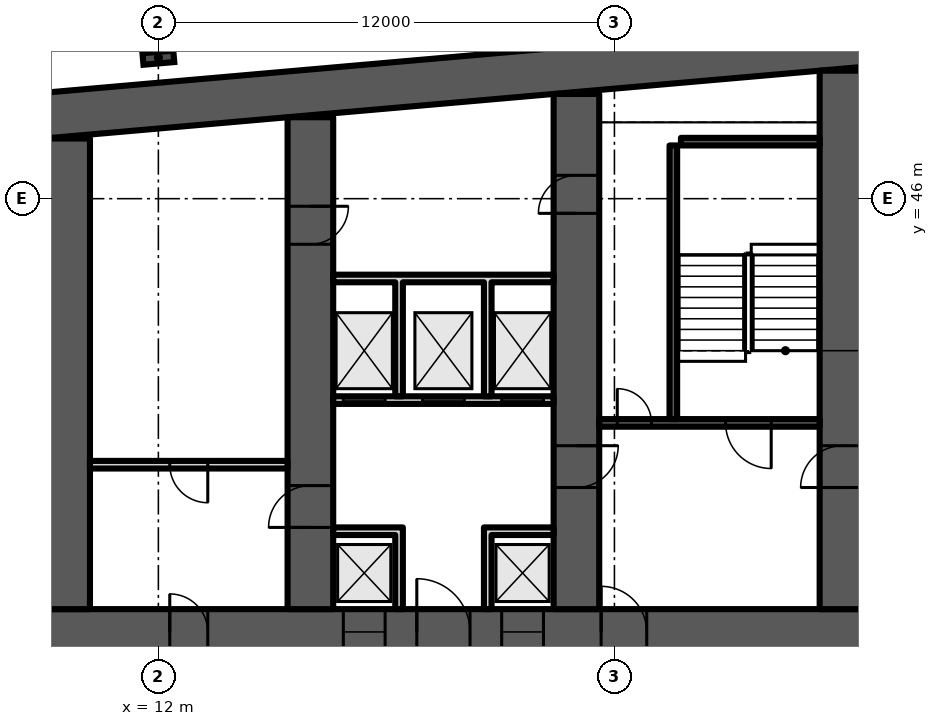
"""IFC4 building model, lengths in metres.
Left out: names, types, materials, properties, quantities, classifications, styles, units other than length and angle.
Written with IfcOpenShell. Run it as: python <this file> out.ifc"""

import sys

from ifc_helpers import new_model, si_unit, direction, frame, frame_2d, origin, origin_2d, place, context, subcontext, project, spatial, polyline, rectangle, i_section, outline, extrude, element, fill, save


model = new_model("IFC4")
c1 = context("Model", 3, precision=1e-05, world=origin(), true_north=direction((0.0, 1.0)))
c2 = subcontext(c1, "Body", "Model", "MODEL_VIEW")
j1 = project(units=[si_unit("LENGTHUNIT", "METRE"), si_unit("PLANEANGLEUNIT", "RADIAN")], contexts=[c1])
p1 = place(None, origin())
s1 = spatial("IfcSite", under=j1, at=p1, CompositionType="ELEMENT")
p2 = place(p1, origin())
s2 = spatial("IfcBuilding", under=s1, at=p2, CompositionType="ELEMENT")
p3 = place(p2, frame((0.0, 0.0, 70.3)))
s3 = spatial("IfcBuildingStorey", under=s2, at=p3, CompositionType="ELEMENT", Elevation=70.3)
p4 = place(p3, frame((0.0, 0.0, -0.0)))
e1 = element("IfcWall", 1, at=p4, inside=s3, PredefinedType="SHEAR", context=c2, shape_type="SweptSolid", body=[
    extrude(outline(polyline([(9.0, 47.583), (37.0, 50.032), (65.0, 47.583), (65.0, 48.787), (37.0, 51.237), (9.0, 48.787), (9.0, 47.583)])), origin(), (0.0, 0.0, 1.0), 3.6),
])
p5 = place(p3, frame((9.0, 34.6, 0.0), z_axis=(0.0, 0.0, 1.0), x_axis=(1.0, 0.0, 0.0)))
e2 = element("IfcWall", 2, at=p5, inside=s3, PredefinedType="SHEAR", context=c2, shape_type="SweptSolid", body=[
    extrude(rectangle(XDim=56.0, YDim=1.2, at=frame_2d((28.0, 0.0))), origin(), (0.0, 0.0, 1.0), 3.6),
])
p6 = place(p5, frame((3.3, 0.0, 0.0)))
e3 = element("IfcOpeningElement", 3, at=p6, cuts=e2, PredefinedType="OPENING", context=c2, shape_type="SweptSolid", body=[
    extrude(rectangle(XDim=1.0, YDim=2.1, at=frame_2d((0.5, 1.05))), frame((0.0, 0.61, 0.0), z_axis=(0.0, -1.0, 0.0), x_axis=(1.0, 0.0, 0.0)), (0.0, 0.0, 1.0), 1.22),
])
p7 = place(p5, frame((7.867, 0.0, 0.0)))
e4 = element("IfcOpeningElement", 4, at=p7, cuts=e2, PredefinedType="OPENING", context=c2, shape_type="SweptSolid", body=[
    extrude(rectangle(XDim=1.1, YDim=2.1, at=frame_2d((0.55, 1.05))), frame((0.0, 0.61, 0.0), z_axis=(0.0, -1.0, 0.0), x_axis=(1.0, 0.0, 0.0)), (0.0, 0.0, 1.0), 1.22),
])
p8 = place(p5, frame((12.033, 0.0, 0.0)))
e5 = element("IfcOpeningElement", 5, at=p8, cuts=e2, PredefinedType="OPENING", context=c2, shape_type="SweptSolid", body=[
    extrude(rectangle(XDim=1.1, YDim=2.1, at=frame_2d((0.55, 1.05))), frame((0.0, 0.61, 0.0), z_axis=(0.0, -1.0, 0.0), x_axis=(1.0, 0.0, 0.0)), (0.0, 0.0, 1.0), 1.22),
])
p9 = place(p5, frame((9.8, 0.0, 0.0)))
e6 = element("IfcOpeningElement", 6, at=p9, cuts=e2, PredefinedType="OPENING", context=c2, shape_type="SweptSolid", body=[
    extrude(rectangle(XDim=1.4, YDim=2.1, at=frame_2d((0.7, 1.05))), frame((0.0, 0.61, 0.0), z_axis=(0.0, -1.0, 0.0), x_axis=(1.0, 0.0, 0.0)), (0.0, 0.0, 1.0), 1.22),
])
p10 = place(p5, frame((14.65, 0.0, 0.0)))
e7 = element("IfcOpeningElement", 7, at=p10, cuts=e2, PredefinedType="OPENING", context=c2, shape_type="SweptSolid", body=[
    extrude(rectangle(XDim=1.2, YDim=2.1, at=frame_2d((0.6, 1.05))), frame((0.0, 0.61, 0.0), z_axis=(0.0, -1.0, 0.0), x_axis=(1.0, 0.0, 0.0)), (0.0, 0.0, 1.0), 1.22),
])
p11 = place(p5, frame((21.867, 0.0, 0.0)))
e8 = element("IfcOpeningElement", 8, at=p11, cuts=e2, PredefinedType="OPENING", context=c2, shape_type="SweptSolid", body=[
    extrude(rectangle(XDim=1.1, YDim=2.1, at=frame_2d((0.55, 1.05))), frame((0.0, 0.61, 0.0), z_axis=(0.0, -1.0, 0.0), x_axis=(1.0, 0.0, 0.0)), (0.0, 0.0, 1.0), 1.22),
])
p12 = place(p5, frame((26.033, 0.0, 0.0)))
e9 = element("IfcOpeningElement", 9, at=p12, cuts=e2, PredefinedType="OPENING", context=c2, shape_type="SweptSolid", body=[
    extrude(rectangle(XDim=1.1, YDim=2.1, at=frame_2d((0.55, 1.05))), frame((0.0, 0.61, 0.0), z_axis=(0.0, -1.0, 0.0), x_axis=(1.0, 0.0, 0.0)), (0.0, 0.0, 1.0), 1.22),
])
p13 = place(p5, frame((23.8, 0.0, 0.0)))
e10 = element("IfcOpeningElement", 10, at=p13, cuts=e2, PredefinedType="OPENING", context=c2, shape_type="SweptSolid", body=[
    extrude(rectangle(XDim=1.4, YDim=2.1, at=frame_2d((0.7, 1.05))), frame((0.0, 0.61, 0.0), z_axis=(0.0, -1.0, 0.0), x_axis=(1.0, 0.0, 0.0)), (0.0, 0.0, 1.0), 1.22),
])
p14 = place(p5, frame((28.867, 0.0, 0.0)))
e11 = element("IfcOpeningElement", 11, at=p14, cuts=e2, PredefinedType="OPENING", context=c2, shape_type="SweptSolid", body=[
    extrude(rectangle(XDim=1.1, YDim=2.1, at=frame_2d((0.55, 1.05))), frame((0.0, 0.61, 0.0), z_axis=(0.0, -1.0, 0.0), x_axis=(1.0, 0.0, 0.0)), (0.0, 0.0, 1.0), 1.22),
])
p15 = place(p5, frame((33.033, 0.0, 0.0)))
e12 = element("IfcOpeningElement", 12, at=p15, cuts=e2, PredefinedType="OPENING", context=c2, shape_type="SweptSolid", body=[
    extrude(rectangle(XDim=1.1, YDim=2.1, at=frame_2d((0.55, 1.05))), frame((0.0, 0.61, 0.0), z_axis=(0.0, -1.0, 0.0), x_axis=(1.0, 0.0, 0.0)), (0.0, 0.0, 1.0), 1.22),
])
p16 = place(p5, frame((40.15, 0.0, 0.0)))
e13 = element("IfcOpeningElement", 13, at=p16, cuts=e2, PredefinedType="OPENING", context=c2, shape_type="SweptSolid", body=[
    extrude(rectangle(XDim=1.2, YDim=2.1, at=frame_2d((0.6, 1.05))), frame((0.0, 0.61, 0.0), z_axis=(0.0, -1.0, 0.0), x_axis=(1.0, 0.0, 0.0)), (0.0, 0.0, 1.0), 1.22),
])
p17 = place(p5, frame((44.8, 0.0, 0.0)))
e14 = element("IfcOpeningElement", 14, at=p17, cuts=e2, PredefinedType="OPENING", context=c2, shape_type="SweptSolid", body=[
    extrude(rectangle(XDim=1.4, YDim=2.1, at=frame_2d((0.7, 1.05))), frame((0.0, 0.61, 0.0), z_axis=(0.0, -1.0, 0.0), x_axis=(1.0, 0.0, 0.0)), (0.0, 0.0, 1.0), 1.22),
])
p18 = place(p5, frame((49.867, 0.0, 0.0)))
e15 = element("IfcOpeningElement", 15, at=p18, cuts=e2, PredefinedType="OPENING", context=c2, shape_type="SweptSolid", body=[
    extrude(rectangle(XDim=1.1, YDim=2.1, at=frame_2d((0.55, 1.05))), frame((0.0, 0.61, 0.0), z_axis=(0.0, -1.0, 0.0), x_axis=(1.0, 0.0, 0.0)), (0.0, 0.0, 1.0), 1.22),
])
p19 = place(p5, frame((53.5, 0.0, 0.0)))
e16 = element("IfcOpeningElement", 16, at=p19, cuts=e2, PredefinedType="OPENING", context=c2, shape_type="SweptSolid", body=[
    extrude(rectangle(XDim=1.1, YDim=2.1, at=frame_2d((0.55, 1.05))), frame((0.0, 0.61, 0.0), z_axis=(0.0, -1.0, 0.0), x_axis=(1.0, 0.0, 0.0)), (0.0, 0.0, 1.0), 1.22),
])
p20 = place(p5, frame((51.567, 0.0, 0.0)))
e17 = element("IfcOpeningElement", 17, at=p20, cuts=e2, PredefinedType="OPENING", context=c2, shape_type="SweptSolid", body=[
    extrude(rectangle(XDim=1.4, YDim=2.1, at=frame_2d((0.7, 1.05))), frame((0.0, 0.61, 0.0), z_axis=(0.0, -1.0, 0.0), x_axis=(1.0, 0.0, 0.0)), (0.0, 0.0, 1.0), 1.22),
])
p21 = place(p3, frame((9.6, 35.2, 0.0), z_axis=(0.0, 0.0, 1.0), x_axis=(0.0, 1.0, 0.0)))
e18 = element("IfcWall", 18, at=p21, inside=s3, PredefinedType="SHEAR", context=c2, shape_type="SweptSolid", body=[
    extrude(rectangle(XDim=12.383, YDim=1.2, at=frame_2d((6.191, 0.0))), origin(), (0.0, 0.0, 1.0), 3.6),
])
p22 = place(p3, frame((16.0, 35.2, 0.0), z_axis=(0.0, 0.0, 1.0), x_axis=(0.0, 1.0, 0.0)))
e19 = element("IfcWall", 19, at=p22, inside=s3, PredefinedType="SHEAR", context=c2, shape_type="SweptSolid", body=[
    extrude(rectangle(XDim=12.943, YDim=1.2, at=frame_2d((6.471, 0.0))), origin(), (0.0, 0.0, 1.0), 3.6),
])
p23 = place(p22, frame((2.15, 0.0, 0.0)))
e20 = element("IfcOpeningElement", 20, at=p23, cuts=e19, PredefinedType="OPENING", context=c2, shape_type="SweptSolid", body=[
    extrude(rectangle(XDim=1.1, YDim=2.1, at=frame_2d((0.55, 1.05))), frame((0.0, 0.61, 0.0), z_axis=(0.0, -1.0, 0.0), x_axis=(1.0, 0.0, 0.0)), (0.0, 0.0, 1.0), 1.22),
])
p24 = place(p22, frame((9.6, 0.0, 0.0)))
e21 = element("IfcOpeningElement", 21, at=p24, cuts=e19, PredefinedType="OPENING", context=c2, shape_type="SweptSolid", body=[
    extrude(rectangle(XDim=1.0, YDim=2.1, at=frame_2d((0.5, 1.05))), frame((0.0, 0.61, 0.0), z_axis=(0.0, -1.0, 0.0), x_axis=(1.0, 0.0, 0.0)), (0.0, 0.0, 1.0), 1.22),
])
p25 = place(p3, frame((23.0, 35.2, 0.0), z_axis=(0.0, 0.0, 1.0), x_axis=(0.0, 1.0, 0.0)))
e22 = element("IfcWall", 22, at=p25, inside=s3, PredefinedType="SHEAR", context=c2, shape_type="SweptSolid", body=[
    extrude(rectangle(XDim=13.555, YDim=1.2, at=frame_2d((6.778, 0.0))), origin(), (0.0, 0.0, 1.0), 3.6),
])
p26 = place(p25, frame((10.414, 0.0, 0.0)))
e23 = element("IfcOpeningElement", 23, at=p26, cuts=e22, PredefinedType="OPENING", context=c2, shape_type="SweptSolid", body=[
    extrude(rectangle(XDim=1.0, YDim=2.1, at=frame_2d((0.5, 1.05))), frame((0.0, 0.61, 0.0), z_axis=(0.0, -1.0, 0.0), x_axis=(1.0, 0.0, 0.0)), (0.0, 0.0, 1.0), 1.22),
])
p27 = place(p25, frame((3.2, 0.0, 0.0)))
e24 = element("IfcOpeningElement", 24, at=p27, cuts=e22, PredefinedType="OPENING", context=c2, shape_type="SweptSolid", body=[
    extrude(rectangle(XDim=1.1, YDim=2.1, at=frame_2d((0.55, 1.05))), frame((0.0, 0.61, 0.0), z_axis=(0.0, -1.0, 0.0), x_axis=(1.0, 0.0, 0.0)), (0.0, 0.0, 1.0), 1.22),
])
p28 = place(p3, frame((30.0, 35.2, 0.0), z_axis=(0.0, 0.0, 1.0), x_axis=(0.0, 1.0, 0.0)))
e25 = element("IfcWall", 25, at=p28, inside=s3, PredefinedType="SHEAR", context=c2, shape_type="SweptSolid", body=[
    extrude(rectangle(XDim=14.168, YDim=1.2, at=frame_2d((7.084, 0.0))), origin(), (0.0, 0.0, 1.0), 3.6),
])
p29 = place(p28, frame((3.2, 0.0, 0.0)))
e26 = element("IfcOpeningElement", 26, at=p29, cuts=e25, PredefinedType="OPENING", context=c2, shape_type="SweptSolid", body=[
    extrude(rectangle(XDim=1.1, YDim=2.1, at=frame_2d((0.55, 1.05))), frame((0.0, 0.61, 0.0), z_axis=(0.0, -1.0, 0.0), x_axis=(1.0, 0.0, 0.0)), (0.0, 0.0, 1.0), 1.22),
])
p30 = place(p3, frame((12.0, 49.71, 0.0), z_axis=(0.0, 0.0, 1.0), x_axis=(-0.087156, 0.996197, 0.0)))
e27 = element("IfcColumn", 27, at=p30, inside=s3, PredefinedType="COLUMN", context=c2, shape_type="SweptSolid", body=[
    extrude(i_section(OverallWidth=0.303, OverallDepth=0.814, WebThickness=0.021, FlangeThickness=0.04, FilletRadius=0.03, at=origin_2d()), origin(), (0.0, 0.0, 1.0), 3.6),
])
p31 = place(p3, frame((10.2, 39.0, 0.0), z_axis=(0.0, 0.0, 1.0), x_axis=(1.0, 0.0, 0.0)))
e28 = element("IfcWall", 28, at=p31, inside=s3, PredefinedType="PARTITIONING", context=c2, shape_type="SweptSolid", body=[
    extrude(rectangle(XDim=5.2, YDim=0.2, at=frame_2d((2.6, 0.0))), origin(), (0.0, 0.0, 1.0), 3.2),
])
p32 = place(p31, frame((2.1, 0.0, 0.0)))
e29 = element("IfcOpeningElement", 29, at=p32, cuts=e28, PredefinedType="OPENING", context=c2, shape_type="SweptSolid", body=[
    extrude(rectangle(XDim=1.0, YDim=2.1, at=frame_2d((0.5, 1.05))), frame((0.0, 0.11, 0.0), z_axis=(0.0, -1.0, 0.0), x_axis=(1.0, 0.0, 0.0)), (0.0, 0.0, 1.0), 0.22),
])
p33 = place(p3, frame((16.6, 40.7, 0.0), z_axis=(0.0, 0.0, 1.0), x_axis=(1.0, 0.0, 0.0)))
e30 = element("IfcWall", 30, at=p33, inside=s3, PredefinedType="PARTITIONING", context=c2, shape_type="SweptSolid", body=[
    extrude(rectangle(XDim=5.8, YDim=0.2, at=frame_2d((2.9, 0.0))), origin(), (0.0, 0.0, 1.0), 3.2),
])
p34 = place(p33, frame((0.267, 0.0, 0.0)))
e31 = element("IfcOpeningElement", 31, at=p34, cuts=e30, PredefinedType="OPENING", context=c2, shape_type="SweptSolid", body=[
    extrude(rectangle(XDim=1.1, YDim=2.1, at=frame_2d((0.55, 1.05))), frame((0.0, 0.11, 0.0), z_axis=(0.0, -1.0, 0.0), x_axis=(1.0, 0.0, 0.0)), (0.0, 0.0, 1.0), 0.22),
])
p35 = place(p33, frame((2.35, 0.0, 0.0)))
e32 = element("IfcOpeningElement", 32, at=p35, cuts=e30, PredefinedType="OPENING", context=c2, shape_type="SweptSolid", body=[
    extrude(rectangle(XDim=1.1, YDim=2.1, at=frame_2d((0.55, 1.05))), frame((0.0, 0.11, 0.0), z_axis=(0.0, -1.0, 0.0), x_axis=(1.0, 0.0, 0.0)), (0.0, 0.0, 1.0), 0.22),
])
p36 = place(p33, frame((4.433, 0.0, 0.0)))
e33 = element("IfcOpeningElement", 33, at=p36, cuts=e30, PredefinedType="OPENING", context=c2, shape_type="SweptSolid", body=[
    extrude(rectangle(XDim=1.1, YDim=2.1, at=frame_2d((0.55, 1.05))), frame((0.0, 0.11, 0.0), z_axis=(0.0, -1.0, 0.0), x_axis=(1.0, 0.0, 0.0)), (0.0, 0.0, 1.0), 0.22),
])
p37 = place(p3, frame((0.0, 0.0, -0.0)))
e34 = element("IfcWall", 34, at=p37, inside=s3, PredefinedType="PARTITIONING", context=c2, shape_type="SweptSolid", body=[
    extrude(outline(polyline([(18.233, 37.15), (16.6, 37.15), (16.6, 37.35), (18.233, 37.35), (18.433, 37.35), (18.433, 35.2), (18.233, 35.2), (18.233, 37.15)])), origin(), (0.0, 0.0, 1.0), 3.2),
])
p38 = place(p3, frame((0.0, 0.0, -0.0)))
e35 = element("IfcWall", 35, at=p38, inside=s3, PredefinedType="PARTITIONING", context=c2, shape_type="SweptSolid", body=[
    extrude(outline(polyline([(20.567, 37.35), (20.767, 37.35), (22.4, 37.35), (22.4, 37.15), (20.767, 37.15), (20.767, 35.2), (20.567, 35.2), (20.567, 37.35)])), origin(), (0.0, 0.0, 1.0), 3.2),
])
p39 = place(p3, frame((0.0, 0.0, -0.0)))
e36 = element("IfcWall", 36, at=p39, inside=s3, PredefinedType="PARTITIONING", context=c2, shape_type="SweptSolid", body=[
    extrude(outline(polyline([(18.433, 40.8), (18.233, 40.8), (18.233, 43.8), (16.6, 43.8), (16.6, 44.0), (22.4, 44.0), (22.4, 43.8), (20.767, 43.8), (20.767, 40.8), (20.567, 40.8), (20.567, 43.8), (18.433, 43.8), (18.433, 40.8)])), origin(), (0.0, 0.0, 1.0), 3.2),
])
p40 = place(p3, frame((23.6, 40.1, 0.0), z_axis=(0.0, 0.0, 1.0), x_axis=(1.0, 0.0, 0.0)))
e37 = element("IfcWall", 37, at=p40, inside=s3, PredefinedType="SHEAR", context=c2, shape_type="SweptSolid", body=[
    extrude(rectangle(XDim=5.8, YDim=0.2, at=frame_2d((2.9, 0.0))), origin(), (0.0, 0.0, 1.0), 3.2),
])
p41 = place(p40, frame((3.325, 0.0, 0.0)))
e38 = element("IfcOpeningElement", 38, at=p41, cuts=e37, PredefinedType="OPENING", context=c2, shape_type="SweptSolid", body=[
    extrude(rectangle(XDim=1.2, YDim=2.1, at=frame_2d((0.6, 1.05))), frame((0.0, 0.11, 0.0), z_axis=(0.0, -1.0, 0.0), x_axis=(1.0, 0.0, 0.0)), (0.0, 0.0, 1.0), 0.22),
])
p42 = place(p40, frame((0.475, 0.0, 0.0)))
e39 = element("IfcOpeningElement", 39, at=p42, cuts=e37, PredefinedType="OPENING", context=c2, shape_type="SweptSolid", body=[
    extrude(rectangle(XDim=0.9, YDim=2.1, at=frame_2d((0.45, 1.05))), frame((0.0, 0.11, 0.0), z_axis=(0.0, -1.0, 0.0), x_axis=(1.0, 0.0, 0.0)), (0.0, 0.0, 1.0), 0.22),
])
p43 = place(p3, frame((25.55, 40.2, 0.0), z_axis=(0.0, 0.0, 1.0), x_axis=(0.0, 1.0, 0.0)))
e40 = element("IfcWall", 40, at=p43, inside=s3, PredefinedType="SHEAR", context=c2, shape_type="SweptSolid", body=[
    extrude(rectangle(XDim=7.2, YDim=0.2, at=frame_2d((3.6, 0.0))), origin(), (0.0, 0.0, 1.0), 3.2),
])
p44 = place(p3, frame((25.75, 47.5, 0.0), z_axis=(0.0, 0.0, 1.0), x_axis=(1.0, 0.0, 0.0)))
e41 = element("IfcWall", 41, at=p44, inside=s3, PredefinedType="SHEAR", context=c2, shape_type="SweptSolid", body=[
    extrude(rectangle(XDim=3.65, YDim=0.2, at=frame_2d((1.825, 0.0))), origin(), (0.0, 0.0, 1.0), 3.2),
])
p45 = place(p6, origin())
e42 = element("IfcDoor", 42, at=p45, inside=s3, OperationType="SINGLE_SWING_LEFT", PredefinedType="DOOR", context=c2, shape_type="SweptSolid", body=[
    extrude(rectangle(XDim=1.0, YDim=2.1, at=frame_2d((0.5, 1.05))), frame((0.0, 0.6, 0.0), z_axis=(0.0, -1.0, 0.0), x_axis=(1.0, 0.0, 0.0)), (0.0, 0.0, 1.0), 1.199),
])
fill(e3, e42)
p46 = place(p32, origin())
e43 = element("IfcDoor", 43, at=p46, inside=s3, OperationType="SINGLE_SWING_RIGHT", PredefinedType="DOOR", context=c2, shape_type="SweptSolid", body=[
    extrude(rectangle(XDim=1.0, YDim=2.1, at=frame_2d((0.5, 1.05))), frame((0.0, 0.025, 0.0), z_axis=(0.0, -1.0, 0.0), x_axis=(1.0, 0.0, 0.0)), (0.0, 0.0, 1.0), 0.05),
])
fill(e29, e43)
p47 = place(p7, origin())
e44 = element("IfcDoor", 44, at=p47, inside=s3, OperationType="DOUBLE_DOOR_SLIDING", PredefinedType="DOOR", context=c2, shape_type="SweptSolid", body=[
    extrude(rectangle(XDim=1.1, YDim=2.1, at=frame_2d((0.55, 1.05))), frame((0.0, 0.025, 0.0), z_axis=(0.0, -1.0, 0.0), x_axis=(1.0, 0.0, 0.0)), (0.0, 0.0, 1.0), 0.05),
])
fill(e4, e44)
p48 = place(p8, origin())
e45 = element("IfcDoor", 45, at=p48, inside=s3, OperationType="DOUBLE_DOOR_SLIDING", PredefinedType="DOOR", context=c2, shape_type="SweptSolid", body=[
    extrude(rectangle(XDim=1.1, YDim=2.1, at=frame_2d((0.55, 1.05))), frame((0.0, 0.025, 0.0), z_axis=(0.0, -1.0, 0.0), x_axis=(1.0, 0.0, 0.0)), (0.0, 0.0, 1.0), 0.05),
])
fill(e5, e45)
p49 = place(p9, origin())
e46 = element("IfcDoor", 46, at=p49, inside=s3, OperationType="DOUBLE_DOOR_SINGLE_SWING", PredefinedType="DOOR", context=c2, shape_type="SweptSolid", body=[
    extrude(rectangle(XDim=1.4, YDim=2.1, at=frame_2d((0.7, 1.05))), frame((0.0, 0.025, 0.0), z_axis=(0.0, -1.0, 0.0), x_axis=(1.0, 0.0, 0.0)), (0.0, 0.0, 1.0), 0.05),
])
fill(e6, e46)
p50 = place(p34, origin())
e47 = element("IfcDoor", 47, at=p50, inside=s3, OperationType="DOUBLE_DOOR_SLIDING", PredefinedType="DOOR", context=c2, shape_type="SweptSolid", body=[
    extrude(rectangle(XDim=1.1, YDim=2.1, at=frame_2d((0.55, 1.05))), frame((0.0, 0.025, 0.0), z_axis=(0.0, -1.0, 0.0), x_axis=(1.0, 0.0, 0.0)), (0.0, 0.0, 1.0), 0.05),
])
fill(e31, e47)
p51 = place(p35, origin())
e48 = element("IfcDoor", 48, at=p51, inside=s3, OperationType="DOUBLE_DOOR_SLIDING", PredefinedType="DOOR", context=c2, shape_type="SweptSolid", body=[
    extrude(rectangle(XDim=1.1, YDim=2.1, at=frame_2d((0.55, 1.05))), frame((0.0, 0.025, 0.0), z_axis=(0.0, -1.0, 0.0), x_axis=(1.0, 0.0, 0.0)), (0.0, 0.0, 1.0), 0.05),
])
fill(e32, e48)
p52 = place(p36, origin())
e49 = element("IfcDoor", 49, at=p52, inside=s3, OperationType="DOUBLE_DOOR_SLIDING", PredefinedType="DOOR", context=c2, shape_type="SweptSolid", body=[
    extrude(rectangle(XDim=1.1, YDim=2.1, at=frame_2d((0.55, 1.05))), frame((0.0, 0.025, 0.0), z_axis=(0.0, -1.0, 0.0), x_axis=(1.0, 0.0, 0.0)), (0.0, 0.0, 1.0), 0.05),
])
fill(e33, e49)
p53 = place(p26, origin())
e50 = element("IfcDoor", 50, at=p53, inside=s3, OperationType="SINGLE_SWING_LEFT", PredefinedType="DOOR", context=c2, shape_type="SweptSolid", body=[
    extrude(rectangle(XDim=1.0, YDim=2.1, at=frame_2d((0.5, 1.05))), frame((0.0, 0.6, 0.0), z_axis=(0.0, -1.0, 0.0), x_axis=(1.0, 0.0, 0.0)), (0.0, 0.0, 1.0), 1.199),
])
fill(e23, e50)
p54 = place(p41, origin())
e51 = element("IfcDoor", 51, at=p54, inside=s3, OperationType="SINGLE_SWING_RIGHT", PredefinedType="DOOR", context=c2, shape_type="SweptSolid", body=[
    extrude(rectangle(XDim=1.2, YDim=2.1, at=frame_2d((0.6, 1.05))), frame((0.0, 0.025, 0.0), z_axis=(0.0, -1.0, 0.0), x_axis=(1.0, 0.0, 0.0)), (0.0, 0.0, 1.0), 0.05),
])
fill(e38, e51)
p55 = place(p42, origin())
e52 = element("IfcDoor", 52, at=p55, inside=s3, OperationType="SINGLE_SWING_LEFT", PredefinedType="DOOR", context=c2, shape_type="SweptSolid", body=[
    extrude(rectangle(XDim=0.9, YDim=2.1, at=frame_2d((0.45, 1.05))), frame((0.0, 0.025, 0.0), z_axis=(0.0, -1.0, 0.0), x_axis=(1.0, 0.0, 0.0)), (0.0, 0.0, 1.0), 0.05),
])
fill(e39, e52)
p56 = place(p10, origin())
e53 = element("IfcDoor", 53, at=p56, inside=s3, OperationType="SINGLE_SWING_LEFT", PredefinedType="DOOR", context=c2, shape_type="SweptSolid", body=[
    extrude(rectangle(XDim=1.2, YDim=2.1, at=frame_2d((0.6, 1.05))), frame((0.0, 0.025, 0.0), z_axis=(0.0, -1.0, 0.0), x_axis=(1.0, 0.0, 0.0)), (0.0, 0.0, 1.0), 0.05),
])
fill(e7, e53)
p57 = place(p23, origin())
e54 = element("IfcDoor", 54, at=p57, inside=s3, OperationType="SINGLE_SWING_LEFT", PredefinedType="DOOR", context=c2, shape_type="SweptSolid", body=[
    extrude(rectangle(XDim=1.1, YDim=2.1, at=frame_2d((0.55, 1.05))), frame((0.0, 0.025, 0.0), z_axis=(0.0, -1.0, 0.0), x_axis=(1.0, 0.0, 0.0)), (0.0, 0.0, 1.0), 0.05),
])
fill(e20, e54)
p58 = place(p24, origin())
e55 = element("IfcDoor", 55, at=p58, inside=s3, OperationType="SINGLE_SWING_RIGHT", PredefinedType="DOOR", context=c2, shape_type="SweptSolid", body=[
    extrude(rectangle(XDim=1.0, YDim=2.1, at=frame_2d((0.5, 1.05))), frame((0.0, 0.6, 0.0), z_axis=(0.0, -1.0, 0.0), x_axis=(1.0, 0.0, 0.0)), (0.0, 0.0, 1.0), 1.199),
])
fill(e21, e55)
p59 = place(p27, origin())
e56 = element("IfcDoor", 56, at=p59, inside=s3, OperationType="SINGLE_SWING_RIGHT", PredefinedType="DOOR", context=c2, shape_type="SweptSolid", body=[
    extrude(rectangle(XDim=1.1, YDim=2.1, at=frame_2d((0.55, 1.05))), frame((0.0, 0.025, 0.0), z_axis=(0.0, -1.0, 0.0), x_axis=(1.0, 0.0, 0.0)), (0.0, 0.0, 1.0), 0.05),
])
fill(e24, e56)
p60 = place(p29, origin())
e57 = element("IfcDoor", 57, at=p60, inside=s3, OperationType="SINGLE_SWING_LEFT", PredefinedType="DOOR", context=c2, shape_type="SweptSolid", body=[
    extrude(rectangle(XDim=1.1, YDim=2.1, at=frame_2d((0.55, 1.05))), frame((0.0, 0.025, 0.0), z_axis=(0.0, -1.0, 0.0), x_axis=(1.0, 0.0, 0.0)), (0.0, 0.0, 1.0), 0.05),
])
fill(e26, e57)
save(model, sys.argv[1])
